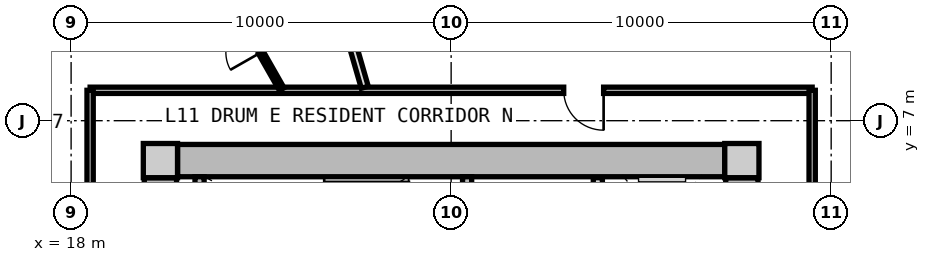
"""IFC4 building model, lengths in metres.
Left out: names, types, materials, properties, quantities, classifications, styles, units other than length and angle.
Written with IfcOpenShell. Run it as: python <this file> out.ifc"""

import sys

from ifc_helpers import new_model, si_unit, direction, frame, frame_2d, origin, origin_2d, place, context, subcontext, project, spatial, rectangle, extrude, source, transform, mapped, element, fill, save


model = new_model("IFC4")
c1 = context("Model", 3, precision=1e-05, world=origin(), true_north=direction((0.0, 1.0)))
c2 = subcontext(c1, "Body", "Model", "MODEL_VIEW")
j1 = project(units=[si_unit("LENGTHUNIT", "METRE"), si_unit("PLANEANGLEUNIT", "RADIAN")], contexts=[c1])
p1 = place(None, origin())
s1 = spatial("IfcSite", under=j1, at=p1, CompositionType="ELEMENT")
p2 = place(p1, origin())
s2 = spatial("IfcBuilding", under=s1, at=p2, CompositionType="ELEMENT")
p3 = place(p2, frame((0.0, 0.0, 39.9)))
s3 = spatial("IfcBuildingStorey", under=s2, at=p3, CompositionType="ELEMENT", Elevation=39.9)
m1 = source(origin(), c2, "Body", "SweptSolid", [
    extrude(rectangle(XDim=0.9, YDim=0.9, at=origin_2d()), origin(), (0.0, 0.0, 1.0), 3.05),
])
for number, where, z_axis, x_axis in (
    (1, (35.65, 5.95, 0.0), (0.0, 0.0, 1.0), (1.0, 0.0, 0.0)),
    (2, (20.35, 5.95, 0.0), (0.0, 0.0, 1.0), (1.0, 0.0, 0.0)),
):
    element("IfcColumn", number, at=place(p3, frame(where, z_axis=z_axis, x_axis=x_axis)), inside=s3, PredefinedType="COLUMN", context=c2, shape_type="MappedRepresentation", body=[
        mapped(m1, transform((0.0, 0.0, 0.0), x_axis=(1.0, 0.0, 0.0), y_axis=(0.0, 1.0, 0.0), z_axis=(0.0, 0.0, 1.0), scale=1.0)),
    ])
m2 = source(origin(), c2, "Body", "SweptSolid", [
    extrude(rectangle(XDim=14.4, YDim=0.85, at=frame_2d((7.2, 0.0))), origin(), (0.0, 0.0, 1.0), 2.79),
])
p4 = place(p3, frame((20.8, 5.95, 0.0), z_axis=(0.0, 0.0, 1.0), x_axis=(1.0, 0.0, 0.0)))
e3 = element("IfcWall", 3, at=p4, inside=s3, PredefinedType="SHEAR", context=c2, shape_type="MappedRepresentation", body=[
    mapped(m2, transform((0.0, 0.0, 0.0), x_axis=(1.0, 0.0, 0.0), y_axis=(0.0, 1.0, 0.0), z_axis=(0.0, 0.0, 1.0), scale=1.0)),
])
m3 = source(origin(), c2, "Body", "SweptSolid", [
    extrude(rectangle(XDim=11.0, YDim=0.85, at=frame_2d((5.5, 0.0))), origin(), (0.0, 0.0, 1.0), 2.79),
])
p5 = place(p3, frame((20.35, -5.5, 0.0), z_axis=(0.0, 0.0, 1.0), x_axis=(0.0, 1.0, 0.0)))
e4 = element("IfcWall", 4, at=p5, inside=s3, PredefinedType="SHEAR", context=c2, shape_type="MappedRepresentation", body=[
    mapped(m3, transform((0.0, 0.0, 0.0), x_axis=(1.0, 0.0, 0.0), y_axis=(0.0, 1.0, 0.0), z_axis=(0.0, 0.0, 1.0), scale=1.0)),
])
p6 = place(p5, frame((3.8, 0.0, 0.0)))
e5 = element("IfcOpeningElement", 5, at=p6, cuts=e4, PredefinedType="OPENING", context=c2, shape_type="SweptSolid", body=[
    extrude(rectangle(XDim=1.2, YDim=2.15, at=frame_2d((0.6, 1.075))), frame((0.0, 0.435, 0.0), z_axis=(0.0, -1.0, 0.0), x_axis=(1.0, 0.0, 0.0)), (0.0, 0.0, 1.0), 0.87),
])
p7 = place(p3, frame((35.65, 5.5, 0.0), z_axis=(0.0, 0.0, 1.0), x_axis=(0.0, -1.0, 0.0)))
e6 = element("IfcWall", 6, at=p7, inside=s3, PredefinedType="SHEAR", context=c2, shape_type="MappedRepresentation", body=[
    mapped(m3, transform((0.0, 0.0, 0.0), x_axis=(1.0, 0.0, 0.0), y_axis=(0.0, 1.0, 0.0), z_axis=(0.0, 0.0, 1.0), scale=1.0)),
])
p8 = place(p7, frame((5.65, 0.0, 0.0)))
e7 = element("IfcOpeningElement", 7, at=p8, cuts=e6, PredefinedType="OPENING", context=c2, shape_type="SweptSolid", body=[
    extrude(rectangle(XDim=1.2, YDim=2.15, at=frame_2d((0.6, 1.075))), frame((0.0, 0.435, 0.0), z_axis=(0.0, -1.0, 0.0), x_axis=(1.0, 0.0, 0.0)), (0.0, 0.0, 1.0), 0.87),
])
p9 = place(p7, frame((9.3, 0.0, 0.0)))
e8 = element("IfcOpeningElement", 8, at=p9, cuts=e6, PredefinedType="OPENING", context=c2, shape_type="SweptSolid", body=[
    extrude(rectangle(XDim=1.0, YDim=2.1, at=frame_2d((0.5, 1.05))), frame((0.0, 0.435, 0.0), z_axis=(0.0, -1.0, 0.0), x_axis=(1.0, 0.0, 0.0)), (0.0, 0.0, 1.0), 0.87),
])
m4 = source(origin(), c2, "Body", "SweptSolid", [
    extrude(rectangle(XDim=3.075, YDim=0.24, at=frame_2d((1.538, 0.0))), origin(), (0.0, 0.0, 1.0), 2.79),
])
p10 = place(p3, frame((21.38, 2.45, 0.0), z_axis=(0.0, 0.0, 1.0), x_axis=(0.0, 1.0, 0.0)))
e9 = element("IfcWall", 9, at=p10, inside=s3, PredefinedType="PARTITIONING", context=c2, shape_type="MappedRepresentation", body=[
    mapped(m4, transform((0.0, 0.0, 0.0), x_axis=(1.0, 0.0, 0.0), y_axis=(0.0, 1.0, 0.0), z_axis=(0.0, 0.0, 1.0), scale=1.0)),
])
p11 = place(p3, frame((28.42, 2.45, 0.0), z_axis=(0.0, 0.0, 1.0), x_axis=(0.0, 1.0, 0.0)))
e10 = element("IfcWall", 10, at=p11, inside=s3, PredefinedType="PARTITIONING", context=c2, shape_type="MappedRepresentation", body=[
    mapped(m4, transform((0.0, 0.0, 0.0), x_axis=(1.0, 0.0, 0.0), y_axis=(0.0, 1.0, 0.0), z_axis=(0.0, 0.0, 1.0), scale=1.0)),
])
p12 = place(p11, frame((0.55, 0.0, 0.0)))
e11 = element("IfcOpeningElement", 11, at=p12, cuts=e10, PredefinedType="OPENING", context=c2, shape_type="SweptSolid", body=[
    extrude(rectangle(XDim=1.1, YDim=2.15, at=frame_2d((0.55, 1.075))), frame((0.0, 0.13, 0.0), z_axis=(0.0, -1.0, 0.0), x_axis=(1.0, 0.0, 0.0)), (0.0, 0.0, 1.0), 0.26),
])
m5 = source(origin(), c2, "Body", "SweptSolid", [
    extrude(rectangle(XDim=5.0, YDim=0.24, at=frame_2d((2.5, 0.0))), origin(), (0.0, 0.0, 1.0), 2.775),
])
p13 = place(p3, frame((31.86, 0.5, 0.0), z_axis=(0.0, 0.0, 1.0), x_axis=(0.0, 1.0, 0.0)))
e12 = element("IfcWall", 12, at=p13, inside=s3, PredefinedType="PARTITIONING", context=c2, shape_type="MappedRepresentation", body=[
    mapped(m5, transform((0.0, 0.0, 0.0), x_axis=(1.0, 0.0, 0.0), y_axis=(0.0, 1.0, 0.0), z_axis=(0.0, 0.0, 1.0), scale=1.0)),
])
p14 = place(p13, frame((3.05, 0.0, 0.0)))
e13 = element("IfcOpeningElement", 13, at=p14, cuts=e12, PredefinedType="OPENING", context=c2, shape_type="SweptSolid", body=[
    extrude(rectangle(XDim=1.3, YDim=2.2, at=frame_2d((0.65, 1.1))), frame((0.0, 0.13, 0.0), z_axis=(0.0, -1.0, 0.0), x_axis=(1.0, 0.0, 0.0)), (0.0, 0.0, 1.0), 0.26),
])
p15 = place(p13, frame((0.55, 0.0, 0.0)))
e14 = element("IfcOpeningElement", 14, at=p15, cuts=e12, PredefinedType="OPENING", context=c2, shape_type="SweptSolid", body=[
    extrude(rectangle(XDim=1.3, YDim=2.2, at=frame_2d((0.65, 1.1))), frame((0.0, 0.13, 0.0), z_axis=(0.0, -1.0, 0.0), x_axis=(1.0, 0.0, 0.0)), (0.0, 0.0, 1.0), 0.26),
])
m6 = source(origin(), c2, "Body", "SweptSolid", [
    extrude(rectangle(XDim=19.0, YDim=0.165, at=frame_2d((9.5, 0.0))), origin(), (0.0, 0.0, 1.0), 2.775),
])
p16 = place(p3, frame((18.5, 7.8, 0.0), z_axis=(0.0, 0.0, 1.0), x_axis=(1.0, 0.0, 0.0)))
e15 = element("IfcWall", 15, at=p16, inside=s3, PredefinedType="PARTITIONING", context=c2, shape_type="MappedRepresentation", body=[
    mapped(m6, transform((0.0, 0.0, 0.0), x_axis=(1.0, 0.0, 0.0), y_axis=(0.0, 1.0, 0.0), z_axis=(0.0, 0.0, 1.0), scale=1.0)),
])
p17 = place(p16, frame((12.462, 0.0, 0.0)))
e16 = element("IfcOpeningElement", 16, at=p17, cuts=e15, PredefinedType="OPENING", context=c2, shape_type="SweptSolid", body=[
    extrude(rectangle(XDim=1.05, YDim=2.15, at=frame_2d((0.525, 1.075))), frame((0.0, 0.093, 0.0), z_axis=(0.0, -1.0, 0.0), x_axis=(1.0, 0.0, 0.0)), (0.0, 0.0, 1.0), 0.185),
])
m7 = source(origin(), c2, "Body", "SweptSolid", [
    extrude(rectangle(XDim=15.6, YDim=0.165, at=frame_2d((7.8, 0.0))), origin(), (0.0, 0.0, 1.0), 2.775),
])
p18 = place(p3, frame((18.5, -7.8, 0.0), z_axis=(0.0, 0.0, 1.0), x_axis=(0.0, 1.0, 0.0)))
e17 = element("IfcWall", 17, at=p18, inside=s3, PredefinedType="PARTITIONING", context=c2, shape_type="MappedRepresentation", body=[
    mapped(m7, transform((0.0, 0.0, 0.0), x_axis=(1.0, 0.0, 0.0), y_axis=(0.0, 1.0, 0.0), z_axis=(0.0, 0.0, 1.0), scale=1.0)),
])
p19 = place(p18, frame((7.275, 0.0, 0.0)))
e18 = element("IfcOpeningElement", 18, at=p19, cuts=e17, PredefinedType="OPENING", context=c2, shape_type="SweptSolid", body=[
    extrude(rectangle(XDim=1.05, YDim=2.15, at=frame_2d((0.525, 1.075))), frame((0.0, 0.093, 0.0), z_axis=(0.0, -1.0, 0.0), x_axis=(1.0, 0.0, 0.0)), (0.0, 0.0, 1.0), 0.185),
])
p20 = place(p3, frame((37.5, 7.8, 0.0), z_axis=(0.0, 0.0, 1.0), x_axis=(0.0, -1.0, 0.0)))
e19 = element("IfcWall", 19, at=p20, inside=s3, PredefinedType="PARTITIONING", context=c2, shape_type="MappedRepresentation", body=[
    mapped(m7, transform((0.0, 0.0, 0.0), x_axis=(1.0, 0.0, 0.0), y_axis=(0.0, 1.0, 0.0), z_axis=(0.0, 0.0, 1.0), scale=1.0)),
])
p21 = place(p20, frame((14.215, 0.0, 0.0)))
e20 = element("IfcOpeningElement", 20, at=p21, cuts=e19, PredefinedType="OPENING", context=c2, shape_type="SweptSolid", body=[
    extrude(rectangle(XDim=0.92, YDim=2.1, at=frame_2d((0.46, 1.05))), frame((0.0, 0.093, 0.0), z_axis=(0.0, -1.0, 0.0), x_axis=(1.0, 0.0, 0.0)), (0.0, 0.0, 1.0), 0.185),
])
p22 = place(p20, frame((11.609, 0.0, 0.0)))
e21 = element("IfcOpeningElement", 21, at=p22, cuts=e19, PredefinedType="OPENING", context=c2, shape_type="SweptSolid", body=[
    extrude(rectangle(XDim=0.92, YDim=2.1, at=frame_2d((0.46, 1.05))), frame((0.0, 0.093, 0.0), z_axis=(0.0, -1.0, 0.0), x_axis=(1.0, 0.0, 0.0)), (0.0, 0.0, 1.0), 0.185),
])
p23 = place(p20, frame((7.175, 0.0, 0.0)))
e22 = element("IfcOpeningElement", 22, at=p23, cuts=e19, PredefinedType="OPENING", context=c2, shape_type="SweptSolid", body=[
    extrude(rectangle(XDim=1.25, YDim=2.2, at=frame_2d((0.625, 1.1))), frame((0.0, 0.093, 0.0), z_axis=(0.0, -1.0, 0.0), x_axis=(1.0, 0.0, 0.0)), (0.0, 0.0, 1.0), 0.185),
])
m8 = source(origin(), c2, "Body", "SweptSolid", [
    extrude(rectangle(XDim=10.196, YDim=0.19, at=frame_2d((5.098, 0.0))), origin(), (0.0, 0.0, 1.0), 2.225),
])
p24 = place(p3, frame((25.727, 7.88, 0.0), z_axis=(0.0, 0.0, 1.0), x_axis=(-0.277136420347, 0.960830580549, 0.0)))
e23 = element("IfcWall", 23, at=p24, inside=s3, PredefinedType="PARTITIONING", context=c2, shape_type="MappedRepresentation", body=[
    mapped(m8, transform((0.0, 0.0, 0.0), x_axis=(1.0, 0.0, 0.0), y_axis=(0.0, 1.0, 0.0), z_axis=(0.0, 0.0, 1.0), scale=1.0)),
])
m9 = source(origin(), c2, "Body", "SweptSolid", [
    extrude(rectangle(XDim=3.141, YDim=0.14, at=frame_2d((1.571, 0.0))), origin(), (0.0, 0.0, 1.0), 2.775),
])
p25 = place(p3, frame((23.542, 7.83, 0.0), z_axis=(0.0, 0.0, 1.0), x_axis=(-0.494874486088, 0.868964465913, 0.0)))
e24 = element("IfcWall", 24, at=p25, inside=s3, PredefinedType="PARTITIONING", context=c2, shape_type="MappedRepresentation", body=[
    mapped(m9, transform((0.0, 0.0, 0.0), x_axis=(1.0, 0.0, 0.0), y_axis=(0.0, 1.0, 0.0), z_axis=(0.0, 0.0, 1.0), scale=1.0)),
])
p26 = place(p25, frame((1.111, 0.0, 0.0)))
e25 = element("IfcOpeningElement", 25, at=p26, cuts=e24, PredefinedType="OPENING", context=c2, shape_type="SweptSolid", body=[
    extrude(rectangle(XDim=0.92, YDim=2.1, at=frame_2d((0.46, 1.05))), frame((0.0, 0.08, 0.0), z_axis=(0.0, -1.0, 0.0), x_axis=(1.0, 0.0, 0.0)), (0.0, 0.0, 1.0), 0.16),
])
m10 = source(origin(), c2, "Body", "SweptSolid", [
    extrude(rectangle(XDim=2.834, YDim=0.14, at=frame_2d((1.417, 0.0))), origin(), (0.0, 0.0, 1.0), 2.775),
])
p27 = place(p3, frame((37.53, 4.732, 0.0), z_axis=(0.0, 0.0, 1.0), x_axis=(0.895681174462, 0.444696788513, 0.0)))
e26 = element("IfcWall", 26, at=p27, inside=s3, PredefinedType="PARTITIONING", context=c2, shape_type="MappedRepresentation", body=[
    mapped(m10, transform((0.0, 0.0, 0.0), x_axis=(1.0, 0.0, 0.0), y_axis=(0.0, 1.0, 0.0), z_axis=(0.0, 0.0, 1.0), scale=1.0)),
])
m11 = source(origin(), c2, "Body", "SweptSolid", [
    extrude(rectangle(XDim=0.92, YDim=2.1, at=frame_2d((0.46, 1.05))), frame((0.0, 0.025, 0.0), z_axis=(0.0, -1.0, 0.0), x_axis=(1.0, 0.0, 0.0)), (0.0, 0.0, 1.0), 0.05),
])
p28 = place(p26, origin())
e27 = element("IfcDoor", 27, at=p28, inside=s3, OperationType="SINGLE_SWING_LEFT", PredefinedType="DOOR", context=c2, shape_type="MappedRepresentation", body=[
    mapped(m11, transform((0.0, 0.0, 0.0), x_axis=(1.0, 0.0, 0.0), y_axis=(0.0, 1.0, 0.0), z_axis=(0.0, 0.0, 1.0), scale=1.0)),
])
fill(e25, e27)
m12 = source(origin(), c2, "Body", "SweptSolid", [
    extrude(rectangle(XDim=1.05, YDim=2.15, at=frame_2d((0.525, 1.075))), frame((0.0, 0.025, 0.0), z_axis=(0.0, -1.0, 0.0), x_axis=(1.0, 0.0, 0.0)), (0.0, 0.0, 1.0), 0.05),
])
p29 = place(p17, frame((1.05, 0.0, 0.0), z_axis=(0.0, 0.0, 1.0), x_axis=(-1.0, 0.0, 0.0)))
e28 = element("IfcDoor", 28, at=p29, inside=s3, OperationType="SINGLE_SWING_LEFT", PredefinedType="DOOR", context=c2, shape_type="MappedRepresentation", body=[
    mapped(m12, transform((0.0, 0.0, 0.0), x_axis=(1.0, 0.0, 0.0), y_axis=(0.0, 1.0, 0.0), z_axis=(0.0, 0.0, 1.0), scale=1.0)),
])
fill(e16, e28)
save(model, sys.argv[1])
